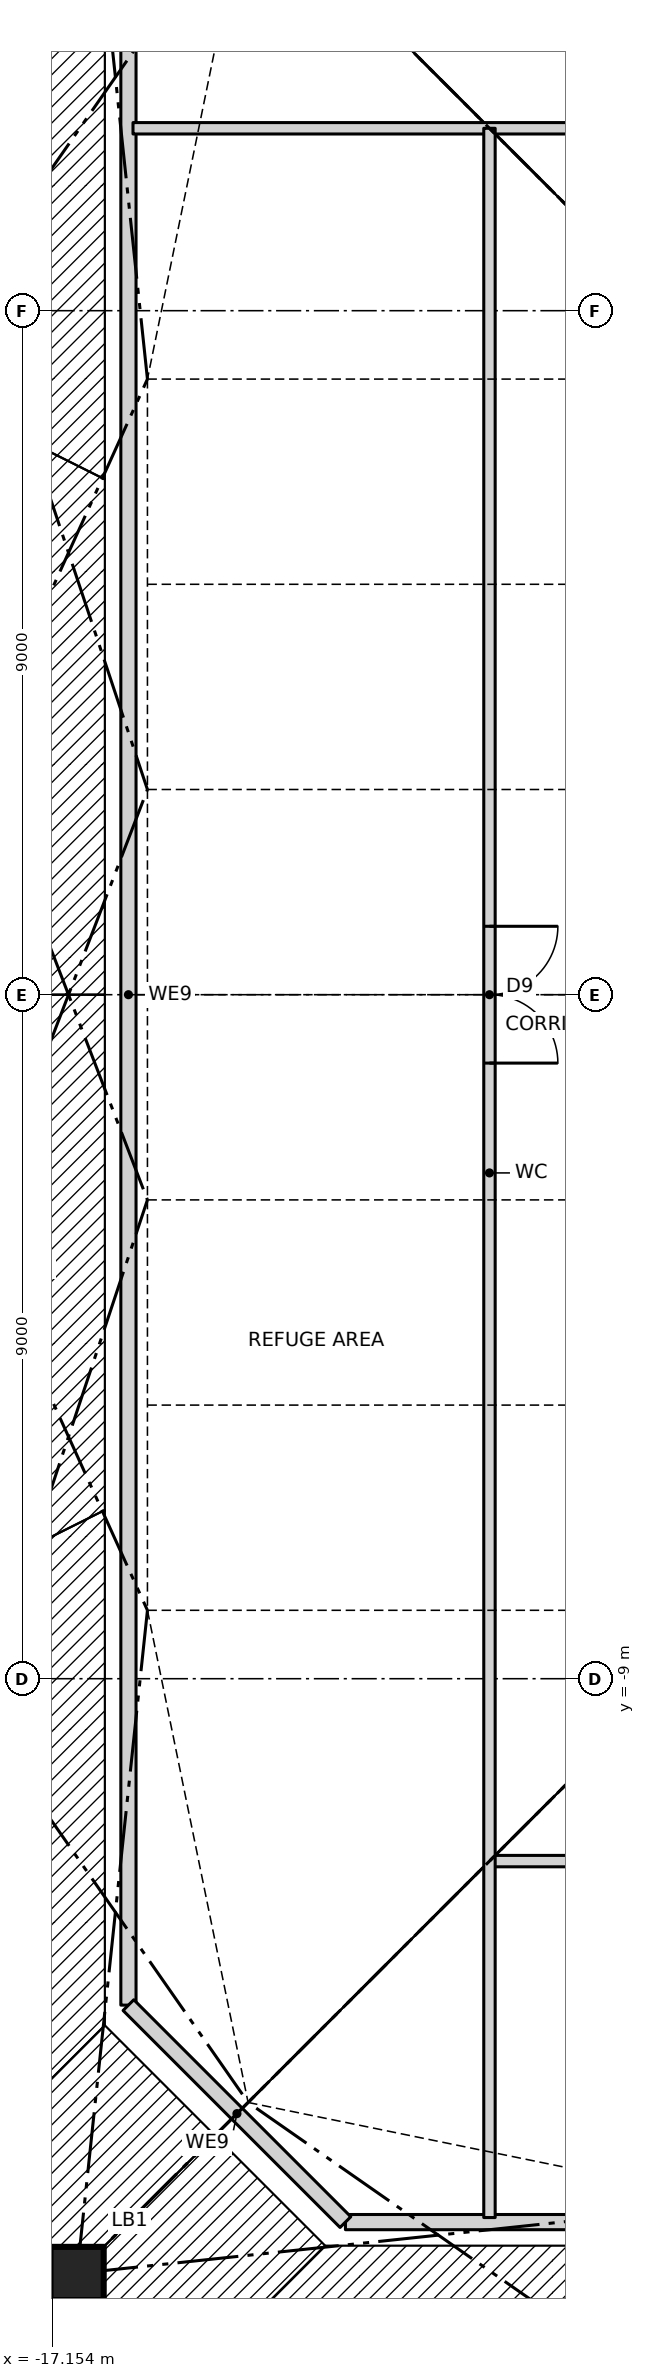
"""IFC4 building model, lengths in metres.
Left out: names, types, materials, properties, quantities, classifications, styles, units other than length and angle.
Written with IfcOpenShell. Run it as: python <this file> out.ifc"""

import sys

from ifc_helpers import new_model, si_unit, direction, frame, frame_2d, origin, origin_2d, place, context, subcontext, project, spatial, rectangle, hollow_rectangle, extrude, clip, halfspace, element, fill, save


model = new_model("IFC4")
c1 = context("Model", 3, precision=1e-05, world=origin(), true_north=direction((0.0, 1.0)))
c2 = subcontext(c1, "Body", "Model", "MODEL_VIEW")
j1 = project(units=[si_unit("LENGTHUNIT", "METRE"), si_unit("PLANEANGLEUNIT", "RADIAN")], contexts=[c1])
p1 = place(None, origin())
s1 = spatial("IfcSite", under=j1, at=p1, CompositionType="ELEMENT")
p2 = place(p1, origin())
s2 = spatial("IfcBuilding", under=s1, at=p2, CompositionType="ELEMENT")
p3 = place(p2, frame((0.0, 0.0, 209.0)))
s3 = spatial("IfcBuildingStorey", under=s2, at=p3, CompositionType="ELEMENT", Elevation=209.0)
p4 = place(p3, frame((-16.826, -16.826, 0.0), z_axis=(0.331294578225, 0.331294578225, 0.883452208599), x_axis=(-0.707106781187, 0.707106781187, 0.0)))
e1 = element("IfcColumn", 1, at=p4, inside=s3, PredefinedType="COLUMN", context=c2, shape_type="Clipping", body=[
    clip(clip(extrude(hollow_rectangle(XDim=0.7, YDim=0.7, WallThickness=0.22, at=origin_2d()), origin(), (0.0, 0.0, 1.0), 6.792), halfspace(frame((0.0, 0.0, 0.0), z_axis=(0.0, -0.468521285666, -0.883452208599), x_axis=(-0.707106781187, -0.624695047554, 0.331294578225)), False)), halfspace(frame((0.0, 2.811, 5.301), z_axis=(0.0, 0.468521285666, 0.883452208599), x_axis=(-0.707106781187, -0.624695047554, 0.331294578225)), False)),
])
p5 = place(p3, frame((-18.15, 9.45, 0.0), z_axis=(0.343583115532, -0.206127500627, 0.91622164142), x_axis=(0.514454704863, 0.857517554715, 0.0)))
e2 = element("IfcColumn", 2, at=p5, inside=s3, PredefinedType="COLUMN", context=c2, shape_type="Clipping", body=[
    clip(clip(extrude(hollow_rectangle(XDim=0.7, YDim=0.7, WallThickness=0.06, at=origin_2d()), origin(), (0.0, 0.0, 1.0), 6.549), halfspace(frame((0.0, 0.0, 0.0), z_axis=(0.0, -0.400671815572, -0.91622164142), x_axis=(0.514454704863, -0.785676141527, 0.343583115532)), False)), halfspace(frame((0.0, 2.404, 5.497), z_axis=(0.0, 0.400671815572, 0.91622164142), x_axis=(0.514454704863, -0.785676141527, 0.343583115532)), False)),
])
p6 = place(p3, frame((-18.15, 3.15, 0.0), z_axis=(0.350261033367, -0.070044605522, 0.934029422311), x_axis=(0.196095673508, 0.980584767795, 0.0)))
e3 = element("IfcColumn", 3, at=p6, inside=s3, PredefinedType="COLUMN", context=c2, shape_type="Clipping", body=[
    clip(clip(extrude(hollow_rectangle(XDim=0.7, YDim=0.7, WallThickness=0.06, at=origin_2d()), origin(), (0.0, 0.0, 1.0), 6.424), halfspace(frame((0.0, 0.0, 0.0), z_axis=(0.0, -0.357196078167, -0.934029422311), x_axis=(0.196095673508, -0.91589502419, 0.350261033367)), False)), halfspace(frame((0.0, 2.143, 5.604), z_axis=(0.0, 0.357196078167, 0.934029422311), x_axis=(0.196095673508, -0.91589502419, 0.350261033367)), False)),
])
p7 = place(p3, frame((-18.15, -3.15, 0.0), z_axis=(0.350261033367, 0.070044605522, 0.934029422311), x_axis=(-0.196095673508, 0.980584767795, 0.0)))
e4 = element("IfcColumn", 4, at=p7, inside=s3, PredefinedType="COLUMN", context=c2, shape_type="Clipping", body=[
    clip(clip(extrude(hollow_rectangle(XDim=0.7, YDim=0.7, WallThickness=0.06, at=origin_2d()), origin(), (0.0, 0.0, 1.0), 6.424), halfspace(frame((0.0, 0.0, 0.0), z_axis=(0.0, -0.357196078167, -0.934029422311), x_axis=(-0.196095673508, -0.91589502419, 0.350261033367)), False)), halfspace(frame((0.0, 2.143, 5.604), z_axis=(0.0, 0.357196078167, 0.934029422311), x_axis=(-0.196095673508, -0.91589502419, 0.350261033367)), False)),
])
p8 = place(p3, frame((-18.15, -9.45, 0.0), z_axis=(0.343583115532, 0.206127500627, 0.91622164142), x_axis=(-0.514454704863, 0.857517554715, 0.0)))
e5 = element("IfcColumn", 5, at=p8, inside=s3, PredefinedType="COLUMN", context=c2, shape_type="Clipping", body=[
    clip(clip(extrude(hollow_rectangle(XDim=0.7, YDim=0.7, WallThickness=0.06, at=origin_2d()), origin(), (0.0, 0.0, 1.0), 6.549), halfspace(frame((0.0, 0.0, 0.0), z_axis=(0.0, -0.400671815572, -0.91622164142), x_axis=(-0.514454704863, -0.785676141527, 0.343583115532)), False)), halfspace(frame((0.0, 2.404, 5.497), z_axis=(0.0, 0.400671815572, 0.91622164142), x_axis=(-0.514454704863, -0.785676141527, 0.343583115532)), False)),
])
for number, where, z_axis, x_axis in (
    (6, (-13.295, -16.15, 0.0), (0.0, 0.0, 1.0), (1.0, 0.0, 0.0)),
    (7, (-16.15, 13.295, 0.0), (0.0, 0.0, 1.0), (0.0, -1.0, 0.0)),
):
    element("IfcWall", number, at=place(p3, frame(where, z_axis=z_axis, x_axis=x_axis)), inside=s3, PredefinedType="PARTITIONING", context=c2, shape_type="SweptSolid", body=[
        extrude(rectangle(XDim=26.59, YDim=0.2, at=frame_2d((13.295, 0.0))), origin(), (0.0, 0.0, 1.0), 5.7),
    ])
p9 = place(p3, frame((-16.15, -13.295, 0.0), z_axis=(0.0, 0.0, 1.0), x_axis=(0.707106781187, -0.707106781187, 0.0)))
e8 = element("IfcWall", 8, at=p9, inside=s3, PredefinedType="PARTITIONING", context=c2, shape_type="SweptSolid", body=[
    extrude(rectangle(XDim=4.038, YDim=0.2, at=frame_2d((2.019, 0.0))), origin(), (0.0, 0.0, 1.0), 5.7),
])
p10 = place(p3, frame((-11.4, -11.4, 0.0), z_axis=(0.0, 0.0, 1.0), x_axis=(1.0, 0.0, 0.0)))
e9 = element("IfcWall", 9, at=p10, inside=s3, PredefinedType="PARTITIONING", context=c2, shape_type="SweptSolid", body=[
    extrude(rectangle(XDim=27.49, YDim=0.15, at=frame_2d((13.745, 0.0))), origin(), (0.0, 0.0, 1.0), 5.77),
])
p11 = place(p10, frame((4.1, 0.0, 0.0)))
e10 = element("IfcOpeningElement", 10, at=p11, cuts=e9, PredefinedType="OPENING", context=c2, shape_type="SweptSolid", body=[
    extrude(rectangle(XDim=1.8, YDim=2.1, at=frame_2d((0.9, 1.05))), frame((0.0, 0.085, 0.0), z_axis=(0.0, -1.0, 0.0), x_axis=(1.0, 0.0, 0.0)), (0.0, 0.0, 1.0), 0.17),
])
p12 = place(p10, frame((12.6, 0.0, 0.0)))
e11 = element("IfcOpeningElement", 11, at=p12, cuts=e9, PredefinedType="OPENING", context=c2, shape_type="SweptSolid", body=[
    extrude(rectangle(XDim=1.8, YDim=2.1, at=frame_2d((0.9, 1.05))), frame((0.0, 0.085, 0.0), z_axis=(0.0, -1.0, 0.0), x_axis=(1.0, 0.0, 0.0)), (0.0, 0.0, 1.0), 0.17),
])
p13 = place(p10, frame((19.0, 0.0, 0.0)))
e12 = element("IfcOpeningElement", 12, at=p13, cuts=e9, PredefinedType="OPENING", context=c2, shape_type="SweptSolid", body=[
    extrude(rectangle(XDim=1.8, YDim=2.1, at=frame_2d((0.9, 1.05))), frame((0.0, 0.085, 0.0), z_axis=(0.0, -1.0, 0.0), x_axis=(1.0, 0.0, 0.0)), (0.0, 0.0, 1.0), 0.17),
])
p14 = place(p3, frame((-16.09, 11.4, 0.0), z_axis=(0.0, 0.0, 1.0), x_axis=(1.0, 0.0, 0.0)))
e13 = element("IfcWall", 13, at=p14, inside=s3, PredefinedType="PARTITIONING", context=c2, shape_type="SweptSolid", body=[
    extrude(rectangle(XDim=27.49, YDim=0.15, at=frame_2d((13.745, 0.0))), origin(), (0.0, 0.0, 1.0), 5.77),
])
p15 = place(p14, frame((23.09, 0.0, 0.0)))
e14 = element("IfcOpeningElement", 14, at=p15, cuts=e13, PredefinedType="OPENING", context=c2, shape_type="SweptSolid", body=[
    extrude(rectangle(XDim=1.8, YDim=2.1, at=frame_2d((0.9, 1.05))), frame((0.0, 0.085, 0.0), z_axis=(0.0, -1.0, 0.0), x_axis=(1.0, 0.0, 0.0)), (0.0, 0.0, 1.0), 0.17),
])
p16 = place(p14, frame((15.59, 0.0, 0.0)))
e15 = element("IfcOpeningElement", 15, at=p16, cuts=e13, PredefinedType="OPENING", context=c2, shape_type="SweptSolid", body=[
    extrude(rectangle(XDim=1.8, YDim=2.1, at=frame_2d((0.9, 1.05))), frame((0.0, 0.085, 0.0), z_axis=(0.0, -1.0, 0.0), x_axis=(1.0, 0.0, 0.0)), (0.0, 0.0, 1.0), 0.17),
])
p17 = place(p14, frame((7.69, 0.0, 0.0)))
e16 = element("IfcOpeningElement", 16, at=p17, cuts=e13, PredefinedType="OPENING", context=c2, shape_type="SweptSolid", body=[
    extrude(rectangle(XDim=1.8, YDim=2.1, at=frame_2d((0.9, 1.05))), frame((0.0, 0.085, 0.0), z_axis=(0.0, -1.0, 0.0), x_axis=(1.0, 0.0, 0.0)), (0.0, 0.0, 1.0), 0.17),
])
p18 = place(p3, frame((-11.4, -16.09, 0.0), z_axis=(0.0, 0.0, 1.0), x_axis=(0.0, 1.0, 0.0)))
e17 = element("IfcWall", 17, at=p18, inside=s3, PredefinedType="PARTITIONING", context=c2, shape_type="SweptSolid", body=[
    extrude(rectangle(XDim=27.49, YDim=0.15, at=frame_2d((13.745, 0.0))), origin(), (0.0, 0.0, 1.0), 5.77),
])
p19 = place(p18, frame((15.19, 0.0, 0.0)))
e18 = element("IfcOpeningElement", 18, at=p19, cuts=e17, PredefinedType="OPENING", context=c2, shape_type="SweptSolid", body=[
    extrude(rectangle(XDim=1.8, YDim=2.1, at=frame_2d((0.9, 1.05))), frame((0.0, 0.085, 0.0), z_axis=(0.0, -1.0, 0.0), x_axis=(1.0, 0.0, 0.0)), (0.0, 0.0, 1.0), 0.17),
])
p20 = place(p19, frame((1.8, 0.0, 0.0), z_axis=(0.0, 0.0, 1.0), x_axis=(-1.0, 0.0, 0.0)))
e19 = element("IfcDoor", 19, at=p20, inside=s3, OperationType="DOUBLE_DOOR_SINGLE_SWING", PredefinedType="DOOR", context=c2, shape_type="SweptSolid", body=[
    extrude(rectangle(XDim=1.8, YDim=2.1, at=frame_2d((0.9, 1.05))), frame((0.0, 0.025, 0.0), z_axis=(0.0, -1.0, 0.0), x_axis=(1.0, 0.0, 0.0)), (0.0, 0.0, 1.0), 0.05),
])
fill(e18, e19)
save(model, sys.argv[1])
